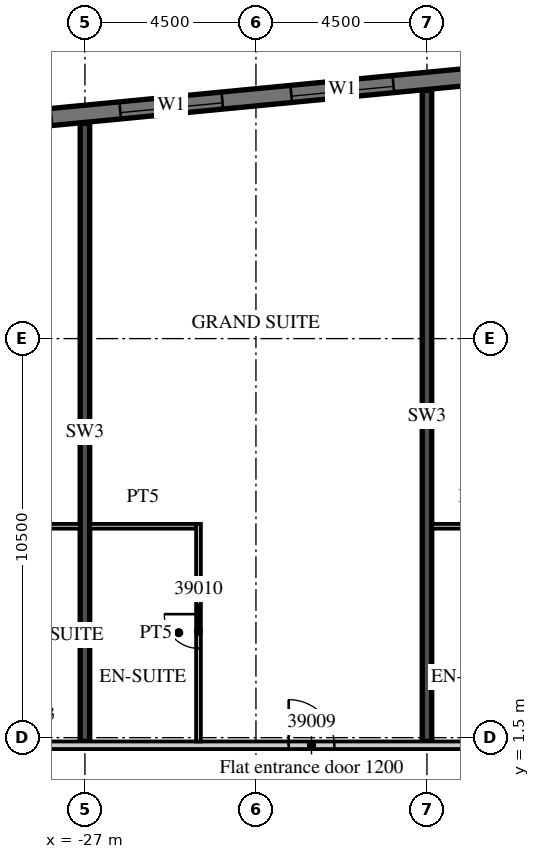
"""IFC4 building model, lengths in metres.
Left out: names, types, materials, properties, quantities, classifications, styles, units other than length and angle.
Written with IfcOpenShell. Run it as: python <this file> out.ifc"""

import sys

from ifc_helpers import new_model, si_unit, direction, frame, frame_2d, origin, place, context, subcontext, project, spatial, rectangle, extrude, element, fill, save


model = new_model("IFC4")
c1 = context("Model", 3, precision=1e-05, world=origin(), true_north=direction((0.0, 1.0)))
c2 = subcontext(c1, "Body", "Model", "MODEL_VIEW")
j1 = project(units=[si_unit("LENGTHUNIT", "METRE"), si_unit("PLANEANGLEUNIT", "RADIAN")], contexts=[c1])
p1 = place(None, origin())
s1 = spatial("IfcSite", under=j1, at=p1, CompositionType="ELEMENT")
p2 = place(p1, origin())
s2 = spatial("IfcBuilding", under=s1, at=p2, CompositionType="ELEMENT")
p3 = place(p2, frame((0.0, 0.0, 170.2)))
s3 = spatial("IfcBuildingStorey", under=s2, at=p3, CompositionType="ELEMENT", Elevation=170.2)
p4 = place(p3, frame((-27.0, 1.4, 0.0), z_axis=(0.0, 0.0, 1.0), x_axis=(0.0, 1.0, 0.0)))
e1 = element("IfcWall", 1, at=p4, inside=s3, PredefinedType="SHEAR", context=c2, shape_type="SweptSolid", body=[
    extrude(rectangle(XDim=16.268, YDim=0.25, at=frame_2d((8.134, 0.0))), origin(), (0.0, 0.0, 1.0), 3.3),
])
p5 = place(p3, frame((-18.0, 1.4, 0.0), z_axis=(0.0, 0.0, 1.0), x_axis=(0.0, 1.0, 0.0)))
e2 = element("IfcWall", 2, at=p5, inside=s3, PredefinedType="SHEAR", context=c2, shape_type="SweptSolid", body=[
    extrude(rectangle(XDim=17.134, YDim=0.25, at=frame_2d((8.567, 0.0))), origin(), (0.0, 0.0, 1.0), 3.3),
])
p6 = place(p3, frame((13.521, 21.817, 0.0), z_axis=(0.0, 0.0, 1.0), x_axis=(-0.995396508751, -0.095842529008, 0.0)))
e3 = element("IfcWall", 3, at=p6, inside=s3, PredefinedType="SOLIDWALL", context=c2, shape_type="SweptSolid", body=[
    extrude(rectangle(XDim=54.591, YDim=0.45, at=frame_2d((27.296, 0.0))), origin(), (0.0, 0.0, 1.0), 3.02),
])
p7 = place(p6, frame((0.91, 0.0, 0.45)))
e4 = element("IfcOpeningElement", 4, at=p7, cuts=e3, PredefinedType="OPENING", context=c2, shape_type="SweptSolid", body=[
    extrude(rectangle(XDim=2.7, YDim=2.25, at=frame_2d((1.35, 1.125))), frame((0.0, 0.235, 0.0), z_axis=(0.0, -1.0, 0.0), x_axis=(1.0, 0.0, 0.0)), (0.0, 0.0, 1.0), 0.47),
])
p8 = place(p6, frame((5.431, 0.0, 0.45)))
e5 = element("IfcOpeningElement", 5, at=p8, cuts=e3, PredefinedType="OPENING", context=c2, shape_type="SweptSolid", body=[
    extrude(rectangle(XDim=2.7, YDim=2.25, at=frame_2d((1.35, 1.125))), frame((0.0, 0.235, 0.0), z_axis=(0.0, -1.0, 0.0), x_axis=(1.0, 0.0, 0.0)), (0.0, 0.0, 1.0), 0.47),
])
p9 = place(p6, frame((9.952, 0.0, 0.45)))
e6 = element("IfcOpeningElement", 6, at=p9, cuts=e3, PredefinedType="OPENING", context=c2, shape_type="SweptSolid", body=[
    extrude(rectangle(XDim=2.7, YDim=2.25, at=frame_2d((1.35, 1.125))), frame((0.0, 0.235, 0.0), z_axis=(0.0, -1.0, 0.0), x_axis=(1.0, 0.0, 0.0)), (0.0, 0.0, 1.0), 0.47),
])
p10 = place(p6, frame((14.473, 0.0, 0.45)))
e7 = element("IfcOpeningElement", 7, at=p10, cuts=e3, PredefinedType="OPENING", context=c2, shape_type="SweptSolid", body=[
    extrude(rectangle(XDim=2.7, YDim=2.25, at=frame_2d((1.35, 1.125))), frame((0.0, 0.235, 0.0), z_axis=(0.0, -1.0, 0.0), x_axis=(1.0, 0.0, 0.0)), (0.0, 0.0, 1.0), 0.47),
])
p11 = place(p6, frame((18.994, 0.0, 0.45)))
e8 = element("IfcOpeningElement", 8, at=p11, cuts=e3, PredefinedType="OPENING", context=c2, shape_type="SweptSolid", body=[
    extrude(rectangle(XDim=2.7, YDim=2.25, at=frame_2d((1.35, 1.125))), frame((0.0, 0.235, 0.0), z_axis=(0.0, -1.0, 0.0), x_axis=(1.0, 0.0, 0.0)), (0.0, 0.0, 1.0), 0.47),
])
p12 = place(p6, frame((23.514, 0.0, 0.45)))
e9 = element("IfcOpeningElement", 9, at=p12, cuts=e3, PredefinedType="OPENING", context=c2, shape_type="SweptSolid", body=[
    extrude(rectangle(XDim=2.7, YDim=2.25, at=frame_2d((1.35, 1.125))), frame((0.0, 0.235, 0.0), z_axis=(0.0, -1.0, 0.0), x_axis=(1.0, 0.0, 0.0)), (0.0, 0.0, 1.0), 0.47),
])
p13 = place(p6, frame((28.035, 0.0, 0.45)))
e10 = element("IfcOpeningElement", 10, at=p13, cuts=e3, PredefinedType="OPENING", context=c2, shape_type="SweptSolid", body=[
    extrude(rectangle(XDim=2.7, YDim=2.25, at=frame_2d((1.35, 1.125))), frame((0.0, 0.235, 0.0), z_axis=(0.0, -1.0, 0.0), x_axis=(1.0, 0.0, 0.0)), (0.0, 0.0, 1.0), 0.47),
])
p14 = place(p6, frame((32.556, 0.0, 0.45)))
e11 = element("IfcOpeningElement", 11, at=p14, cuts=e3, PredefinedType="OPENING", context=c2, shape_type="SweptSolid", body=[
    extrude(rectangle(XDim=2.7, YDim=2.25, at=frame_2d((1.35, 1.125))), frame((0.0, 0.235, 0.0), z_axis=(0.0, -1.0, 0.0), x_axis=(1.0, 0.0, 0.0)), (0.0, 0.0, 1.0), 0.47),
])
p15 = place(p6, frame((37.077, 0.0, 0.45)))
e12 = element("IfcOpeningElement", 12, at=p15, cuts=e3, PredefinedType="OPENING", context=c2, shape_type="SweptSolid", body=[
    extrude(rectangle(XDim=2.7, YDim=2.25, at=frame_2d((1.35, 1.125))), frame((0.0, 0.235, 0.0), z_axis=(0.0, -1.0, 0.0), x_axis=(1.0, 0.0, 0.0)), (0.0, 0.0, 1.0), 0.47),
])
p16 = place(p6, frame((41.598, 0.0, 0.45)))
e13 = element("IfcOpeningElement", 13, at=p16, cuts=e3, PredefinedType="OPENING", context=c2, shape_type="SweptSolid", body=[
    extrude(rectangle(XDim=2.7, YDim=2.25, at=frame_2d((1.35, 1.125))), frame((0.0, 0.235, 0.0), z_axis=(0.0, -1.0, 0.0), x_axis=(1.0, 0.0, 0.0)), (0.0, 0.0, 1.0), 0.47),
])
p17 = place(p6, frame((46.118, 0.0, 0.45)))
e14 = element("IfcOpeningElement", 14, at=p17, cuts=e3, PredefinedType="OPENING", context=c2, shape_type="SweptSolid", body=[
    extrude(rectangle(XDim=2.7, YDim=2.25, at=frame_2d((1.35, 1.125))), frame((0.0, 0.235, 0.0), z_axis=(0.0, -1.0, 0.0), x_axis=(1.0, 0.0, 0.0)), (0.0, 0.0, 1.0), 0.47),
])
p18 = place(p6, frame((50.629, 0.0, 0.45)))
e15 = element("IfcOpeningElement", 15, at=p18, cuts=e3, PredefinedType="OPENING", context=c2, shape_type="SweptSolid", body=[
    extrude(rectangle(XDim=2.7, YDim=2.25, at=frame_2d((1.35, 1.125))), frame((0.0, 0.235, 0.0), z_axis=(0.0, -1.0, 0.0), x_axis=(1.0, 0.0, 0.0)), (0.0, 0.0, 1.0), 0.47),
])
p19 = place(p3, frame((-42.913, 1.3, 0.0), z_axis=(0.0, 0.0, 1.0), x_axis=(1.0, 0.0, 0.0)))
e16 = element("IfcWall", 16, at=p19, inside=s3, PredefinedType="PARTITIONING", context=c2, shape_type="SweptSolid", body=[
    extrude(rectangle(XDim=29.413, YDim=0.2, at=frame_2d((14.707, 0.0))), origin(), (0.0, 0.0, 1.0), 3.02),
])
p20 = place(p19, frame((0.15, 0.0, 0.0)))
e17 = element("IfcOpeningElement", 17, at=p20, cuts=e16, PredefinedType="OPENING", context=c2, shape_type="SweptSolid", body=[
    extrude(rectangle(XDim=0.9, YDim=2.1, at=frame_2d((0.45, 1.05))), frame((0.0, 0.11, 0.0), z_axis=(0.0, -1.0, 0.0), x_axis=(1.0, 0.0, 0.0)), (0.0, 0.0, 1.0), 0.22),
])
p21 = place(p19, frame((5.338, 0.0, 0.0)))
e18 = element("IfcOpeningElement", 18, at=p21, cuts=e16, PredefinedType="OPENING", context=c2, shape_type="SweptSolid", body=[
    extrude(rectangle(XDim=1.0, YDim=2.1, at=frame_2d((0.5, 1.05))), frame((0.0, 0.11, 0.0), z_axis=(0.0, -1.0, 0.0), x_axis=(1.0, 0.0, 0.0)), (0.0, 0.0, 1.0), 0.22),
])
p22 = place(p19, frame((7.488, 0.0, 0.0)))
e19 = element("IfcOpeningElement", 19, at=p22, cuts=e16, PredefinedType="OPENING", context=c2, shape_type="SweptSolid", body=[
    extrude(rectangle(XDim=1.0, YDim=2.1, at=frame_2d((0.5, 1.05))), frame((0.0, 0.11, 0.0), z_axis=(0.0, -1.0, 0.0), x_axis=(1.0, 0.0, 0.0)), (0.0, 0.0, 1.0), 0.22),
])
p23 = place(p19, frame((11.963, 0.0, 0.0)))
e20 = element("IfcOpeningElement", 20, at=p23, cuts=e16, PredefinedType="OPENING", context=c2, shape_type="SweptSolid", body=[
    extrude(rectangle(XDim=1.0, YDim=2.1, at=frame_2d((0.5, 1.05))), frame((0.0, 0.11, 0.0), z_axis=(0.0, -1.0, 0.0), x_axis=(1.0, 0.0, 0.0)), (0.0, 0.0, 1.0), 0.22),
])
p24 = place(p19, frame((21.275, 0.0, 0.0)))
e21 = element("IfcOpeningElement", 21, at=p24, cuts=e16, PredefinedType="OPENING", context=c2, shape_type="SweptSolid", body=[
    extrude(rectangle(XDim=1.2, YDim=2.1, at=frame_2d((0.6, 1.05))), frame((0.0, 0.11, 0.0), z_axis=(0.0, -1.0, 0.0), x_axis=(1.0, 0.0, 0.0)), (0.0, 0.0, 1.0), 0.22),
])
p25 = place(p19, frame((27.838, 0.0, 0.0)))
e22 = element("IfcOpeningElement", 22, at=p25, cuts=e16, PredefinedType="OPENING", context=c2, shape_type="SweptSolid", body=[
    extrude(rectangle(XDim=1.0, YDim=2.1, at=frame_2d((0.5, 1.05))), frame((0.0, 0.11, 0.0), z_axis=(0.0, -1.0, 0.0), x_axis=(1.0, 0.0, 0.0)), (0.0, 0.0, 1.0), 0.22),
])
p26 = place(p3, frame((-29.375, 7.062, 0.0), z_axis=(0.0, 0.0, 1.0), x_axis=(1.0, 0.0, 0.0)))
e23 = element("IfcWall", 23, at=p26, inside=s3, PredefinedType="PARTITIONING", context=c2, shape_type="SweptSolid", body=[
    extrude(rectangle(XDim=2.25, YDim=0.125, at=frame_2d((1.125, 0.0))), origin(), (0.0, 0.0, 1.0), 3.02),
])
p27 = place(p3, frame((-24.012, 1.4, 0.0), z_axis=(0.0, 0.0, 1.0), x_axis=(0.0, 1.0, 0.0)))
e24 = element("IfcWall", 24, at=p27, inside=s3, PredefinedType="PARTITIONING", context=c2, shape_type="SweptSolid", body=[
    extrude(rectangle(XDim=5.725, YDim=0.125, at=frame_2d((2.863, 0.0))), origin(), (0.0, 0.0, 1.0), 3.02),
])
p28 = place(p27, frame((2.45, 0.0, 0.0)))
e25 = element("IfcOpeningElement", 25, at=p28, cuts=e24, PredefinedType="OPENING", context=c2, shape_type="SweptSolid", body=[
    extrude(rectangle(XDim=0.9, YDim=2.1, at=frame_2d((0.45, 1.05))), frame((0.0, 0.073, 0.0), z_axis=(0.0, -1.0, 0.0), x_axis=(1.0, 0.0, 0.0)), (0.0, 0.0, 1.0), 0.145),
])
p29 = place(p3, frame((-26.875, 7.062, 0.0), z_axis=(0.0, 0.0, 1.0), x_axis=(1.0, 0.0, 0.0)))
e26 = element("IfcWall", 26, at=p29, inside=s3, PredefinedType="PARTITIONING", context=c2, shape_type="SweptSolid", body=[
    extrude(rectangle(XDim=2.8, YDim=0.125, at=frame_2d((1.4, 0.0))), origin(), (0.0, 0.0, 1.0), 3.02),
])
p30 = place(p3, frame((-17.875, 7.062, 0.0), z_axis=(0.0, 0.0, 1.0), x_axis=(1.0, 0.0, 0.0)))
e27 = element("IfcWall", 27, at=p30, inside=s3, PredefinedType="PARTITIONING", context=c2, shape_type="SweptSolid", body=[
    extrude(rectangle(XDim=2.25, YDim=0.125, at=frame_2d((1.125, 0.0))), origin(), (0.0, 0.0, 1.0), 3.02),
])
p31 = place(p14, origin())
e28 = element("IfcWindow", 28, at=p31, inside=s3, PartitioningType="SINGLE_PANEL", PredefinedType="WINDOW", context=c2, shape_type="SweptSolid", body=[
    extrude(rectangle(XDim=2.7, YDim=2.25, at=frame_2d((1.35, 1.125))), frame((0.0, 0.09, 0.0), z_axis=(0.0, -1.0, 0.0), x_axis=(1.0, 0.0, 0.0)), (0.0, 0.0, 1.0), 0.06),
])
fill(e11, e28)
p32 = place(p15, origin())
e29 = element("IfcWindow", 29, at=p32, inside=s3, PartitioningType="SINGLE_PANEL", PredefinedType="WINDOW", context=c2, shape_type="SweptSolid", body=[
    extrude(rectangle(XDim=2.7, YDim=2.25, at=frame_2d((1.35, 1.125))), frame((0.0, 0.09, 0.0), z_axis=(0.0, -1.0, 0.0), x_axis=(1.0, 0.0, 0.0)), (0.0, 0.0, 1.0), 0.06),
])
fill(e12, e29)
p33 = place(p24, origin())
e30 = element("IfcDoor", 30, at=p33, inside=s3, OperationType="SINGLE_SWING_LEFT", PredefinedType="DOOR", context=c2, shape_type="SweptSolid", body=[
    extrude(rectangle(XDim=1.2, YDim=2.1, at=frame_2d((0.6, 1.05))), frame((0.0, 0.025, 0.0), z_axis=(0.0, -1.0, 0.0), x_axis=(1.0, 0.0, 0.0)), (0.0, 0.0, 1.0), 0.05),
])
fill(e21, e30)
p34 = place(p28, origin())
e31 = element("IfcDoor", 31, at=p34, inside=s3, OperationType="SINGLE_SWING_RIGHT", PredefinedType="DOOR", context=c2, shape_type="SweptSolid", body=[
    extrude(rectangle(XDim=0.9, YDim=2.1, at=frame_2d((0.45, 1.05))), frame((0.0, 0.025, 0.0), z_axis=(0.0, -1.0, 0.0), x_axis=(1.0, 0.0, 0.0)), (0.0, 0.0, 1.0), 0.05),
])
fill(e25, e31)
save(model, sys.argv[1])
